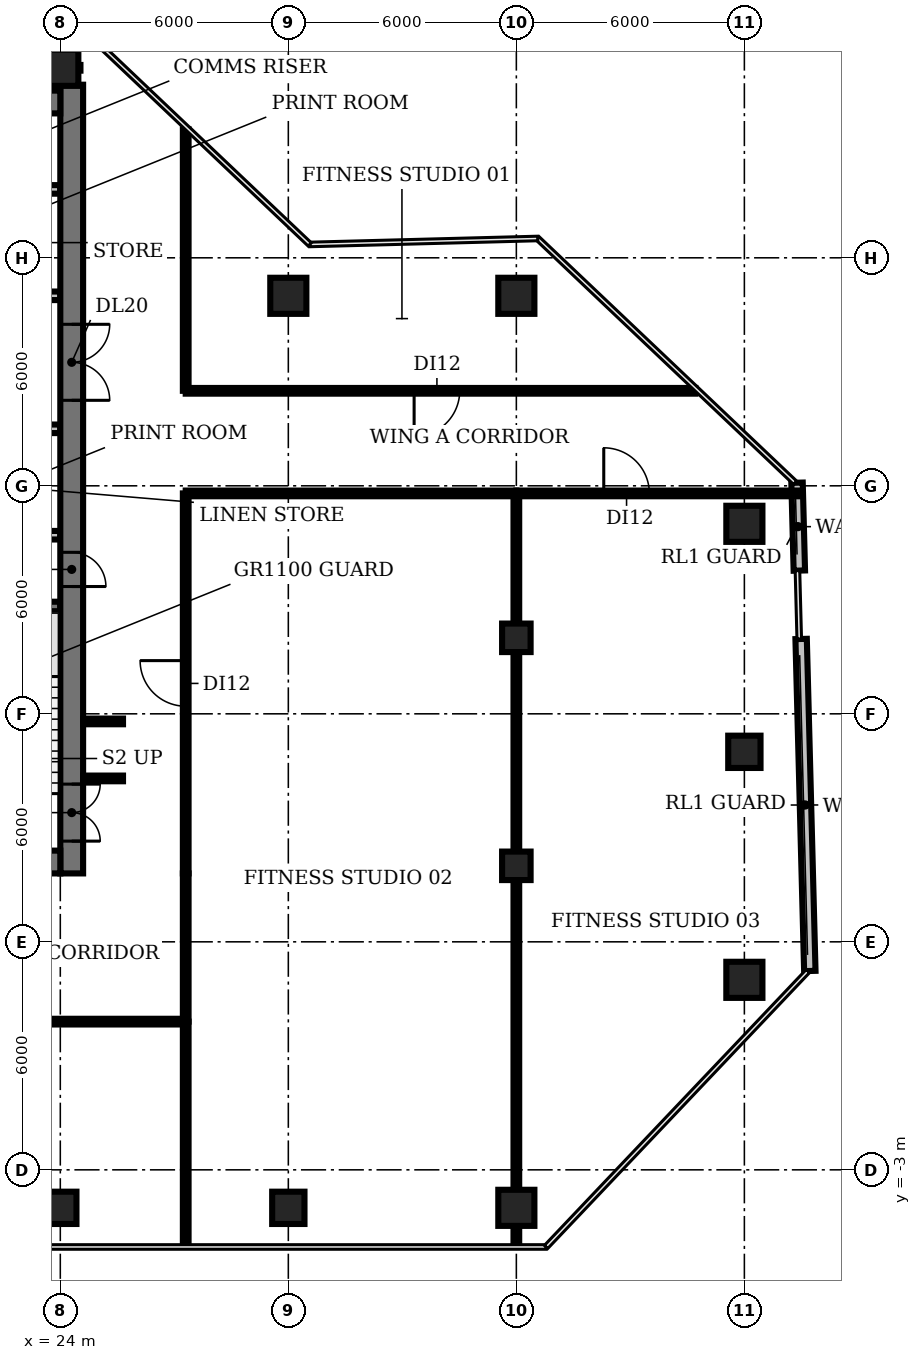
"""IFC4 building model, lengths in metres.
Left out: names, types, materials, properties, quantities, classifications, styles, units other than length and angle.
Written with IfcOpenShell. Run it as: python <this file> out.ifc"""

import sys

from ifc_helpers import new_model, si_unit, direction, frame, frame_2d, origin, origin_2d, place, context, subcontext, project, spatial, rectangle, circle, extrude, element, fill, save


model = new_model("IFC4")
c1 = context("Model", 3, precision=1e-05, world=origin(), true_north=direction((0.0, 1.0)))
c2 = subcontext(c1, "Body", "Model", "MODEL_VIEW")
j1 = project(units=[si_unit("LENGTHUNIT", "METRE"), si_unit("PLANEANGLEUNIT", "RADIAN")], contexts=[c1])
p1 = place(None, origin())
s1 = spatial("IfcSite", under=j1, at=p1, CompositionType="ELEMENT")
p2 = place(p1, origin())
s2 = spatial("IfcBuilding", under=s1, at=p2, CompositionType="ELEMENT")
p3 = place(p2, frame((0.0, 0.0, 176.0)))
s3 = spatial("IfcBuildingStorey", under=s2, at=p3, CompositionType="ELEMENT", Elevation=176.0)
p4 = place(p3, frame((24.0, -4.0, 0.0), z_axis=(0.0, 0.0, 1.0), x_axis=(1.0, 0.0, 0.0)))
e1 = element("IfcColumn", 1, at=p4, inside=s3, PredefinedType="COLUMN", context=c2, shape_type="SweptSolid", body=[
    extrude(rectangle(XDim=0.85, YDim=0.85, at=origin_2d()), origin(), (0.0, 0.0, 1.0), 3.85),
])
p5 = place(p3, frame((24.0, 26.0, 0.0), z_axis=(0.0, 0.0, 1.0), x_axis=(1.0, 0.0, 0.0)))
e2 = element("IfcColumn", 2, at=p5, inside=s3, PredefinedType="COLUMN", context=c2, shape_type="SweptSolid", body=[
    extrude(circle(Radius=0.475, at=origin_2d()), origin(), (0.0, 0.0, 1.0), 3.85),
])
p6 = place(p3, frame((30.0, -4.0, 0.0), z_axis=(0.0, 0.0, 1.0), x_axis=(1.0, 0.0, 0.0)))
e3 = element("IfcColumn", 3, at=p6, inside=s3, PredefinedType="COLUMN", context=c2, shape_type="SweptSolid", body=[
    extrude(rectangle(XDim=0.85, YDim=0.85, at=origin_2d()), origin(), (0.0, 0.0, 1.0), 3.85),
])
for number, where, z_axis, x_axis in (
    (4, (30.0, 20.0, 0.0), (0.0, 0.0, 1.0), (1.0, 0.0, 0.0)),
    (5, (36.0, -4.0, 0.0), (0.0, 0.0, 1.0), (1.0, 0.0, 0.0)),
):
    element("IfcColumn", number, at=place(p3, frame(where, z_axis=z_axis, x_axis=x_axis)), inside=s3, PredefinedType="COLUMN", context=c2, shape_type="SweptSolid", body=[
        extrude(circle(Radius=0.475, at=origin_2d()), origin(), (0.0, 0.0, 1.0), 3.85),
    ])
for number, where, z_axis, x_axis in (
    (6, (36.0, 5.0, 0.0), (0.0, 0.0, 1.0), (1.0, 0.0, 0.0)),
    (7, (36.0, 11.0, 0.0), (0.0, 0.0, 1.0), (1.0, 0.0, 0.0)),
):
    element("IfcColumn", number, at=place(p3, frame(where, z_axis=z_axis, x_axis=x_axis)), inside=s3, PredefinedType="COLUMN", context=c2, shape_type="SweptSolid", body=[
        extrude(rectangle(XDim=0.75, YDim=0.75, at=origin_2d()), origin(), (0.0, 0.0, 1.0), 3.85),
    ])
for number, where, z_axis, x_axis in (
    (8, (36.0, 20.0, 0.0), (0.0, 0.0, 1.0), (1.0, 0.0, 0.0)),
    (9, (42.0, 2.0, 0.0), (0.0, 0.0, 1.0), (1.0, 0.0, 0.0)),
):
    element("IfcColumn", number, at=place(p3, frame(where, z_axis=z_axis, x_axis=x_axis)), inside=s3, PredefinedType="COLUMN", context=c2, shape_type="SweptSolid", body=[
        extrude(circle(Radius=0.475, at=origin_2d()), origin(), (0.0, 0.0, 1.0), 3.85),
    ])
p7 = place(p3, frame((42.0, 8.0, 0.0), z_axis=(0.0, 0.0, 1.0), x_axis=(1.0, 0.0, 0.0)))
e10 = element("IfcColumn", 10, at=p7, inside=s3, PredefinedType="COLUMN", context=c2, shape_type="SweptSolid", body=[
    extrude(rectangle(XDim=0.85, YDim=0.85, at=origin_2d()), origin(), (0.0, 0.0, 1.0), 3.85),
])
p8 = place(p3, frame((42.0, 14.0, 0.0), z_axis=(0.0, 0.0, 1.0), x_axis=(1.0, 0.0, 0.0)))
e11 = element("IfcColumn", 11, at=p8, inside=s3, PredefinedType="COLUMN", context=c2, shape_type="SweptSolid", body=[
    extrude(circle(Radius=0.475, at=origin_2d()), origin(), (0.0, 0.0, 1.0), 3.85),
])
p9 = place(p3, frame((43.722, 2.233, 0.0), z_axis=(0.0, 0.0, 1.0), x_axis=(-0.026202368137, 0.99965665901, 0.0)))
e12 = element("IfcWall", 12, at=p9, inside=s3, PredefinedType="SOLIDWALL", context=c2, shape_type="SweptSolid", body=[
    extrude(rectangle(XDim=8.74, YDim=0.3, at=frame_2d((4.37, 0.0))), origin(), (0.0, 0.0, 1.0), 3.85),
])
p10 = place(p3, frame((43.446, 12.769, 0.0), z_axis=(0.0, 0.0, 1.0), x_axis=(-0.026065246512, 0.999660243745, 0.0)))
e13 = element("IfcWall", 13, at=p10, inside=s3, PredefinedType="SOLIDWALL", context=c2, shape_type="SweptSolid", body=[
    extrude(rectangle(XDim=2.313, YDim=0.3, at=frame_2d((1.157, 0.0))), origin(), (0.0, 0.0, 1.0), 3.85),
])
p11 = place(p3, frame((20.85, 11.825, 0.0), z_axis=(0.0, 0.0, 1.0), x_axis=(1.0, 0.0, 0.0)))
e14 = element("IfcWall", 14, at=p11, inside=s3, PredefinedType="SHEAR", context=c2, shape_type="SweptSolid", body=[
    extrude(rectangle(XDim=3.15, YDim=0.25, at=frame_2d((1.575, 0.0))), origin(), (0.0, 0.0, 1.0), 3.85),
])
p12 = place(p3, frame((16.6, 13.7, 0.0), z_axis=(0.0, 0.0, 1.0), x_axis=(1.0, 0.0, 0.0)))
e15 = element("IfcWall", 15, at=p12, inside=s3, PredefinedType="PARTITIONING", context=c2, shape_type="SweptSolid", body=[
    extrude(rectangle(XDim=7.4, YDim=0.225, at=frame_2d((3.7, 0.0))), origin(), (0.0, 0.0, 1.0), 3.85),
])
p13 = place(p3, frame((9.4, 16.5, 0.0), z_axis=(0.0, 0.0, 1.0), x_axis=(1.0, 0.0, 0.0)))
e16 = element("IfcWall", 16, at=p13, inside=s3, PredefinedType="PARTITIONING", context=c2, shape_type="SweptSolid", body=[
    extrude(rectangle(XDim=14.6, YDim=0.225, at=frame_2d((7.3, 0.0))), origin(), (0.0, 0.0, 1.0), 3.85),
])
p14 = place(p13, frame((0.55, 0.0, 0.0)))
e17 = element("IfcOpeningElement", 17, at=p14, cuts=e16, PredefinedType="OPENING", context=c2, shape_type="SweptSolid", body=[
    extrude(rectangle(XDim=0.9, YDim=2.1, at=frame_2d((0.45, 1.05))), frame((0.0, 0.123, 0.0), z_axis=(0.0, -1.0, 0.0), x_axis=(1.0, 0.0, 0.0)), (0.0, 0.0, 1.0), 0.245),
])
p15 = place(p13, frame((6.075, 0.0, 0.0)))
e18 = element("IfcOpeningElement", 18, at=p15, cuts=e16, PredefinedType="OPENING", context=c2, shape_type="SweptSolid", body=[
    extrude(rectangle(XDim=1.0, YDim=2.1, at=frame_2d((0.5, 1.05))), frame((0.0, 0.123, 0.0), z_axis=(0.0, -1.0, 0.0), x_axis=(1.0, 0.0, 0.0)), (0.0, 0.0, 1.0), 0.245),
])
p16 = place(p13, frame((11.308, 0.0, 0.0)))
e19 = element("IfcOpeningElement", 19, at=p16, cuts=e16, PredefinedType="OPENING", context=c2, shape_type="SweptSolid", body=[
    extrude(rectangle(XDim=0.9, YDim=2.1, at=frame_2d((0.45, 1.05))), frame((0.0, 0.123, 0.0), z_axis=(0.0, -1.0, 0.0), x_axis=(1.0, 0.0, 0.0)), (0.0, 0.0, 1.0), 0.245),
])
p17 = place(p13, frame((13.083, 0.0, 0.0)))
e20 = element("IfcOpeningElement", 20, at=p17, cuts=e16, PredefinedType="OPENING", context=c2, shape_type="SweptSolid", body=[
    extrude(rectangle(XDim=0.9, YDim=2.1, at=frame_2d((0.45, 1.05))), frame((0.0, 0.123, 0.0), z_axis=(0.0, -1.0, 0.0), x_axis=(1.0, 0.0, 0.0)), (0.0, 0.0, 1.0), 0.245),
])
p18 = place(p3, frame((24.0, 20.0, 0.0), z_axis=(0.0, 0.0, 1.0), x_axis=(-1.0, 0.0, 0.0)))
e21 = element("IfcWall", 21, at=p18, inside=s3, PredefinedType="PARTITIONING", context=c2, shape_type="SweptSolid", body=[
    extrude(rectangle(XDim=14.6, YDim=0.225, at=frame_2d((7.3, 0.0))), origin(), (0.0, 0.0, 1.0), 3.85),
])
p19 = place(p18, frame((12.75, 0.0, 0.0)))
e22 = element("IfcOpeningElement", 22, at=p19, cuts=e21, PredefinedType="OPENING", context=c2, shape_type="SweptSolid", body=[
    extrude(rectangle(XDim=1.1, YDim=2.1, at=frame_2d((0.55, 1.05))), frame((0.0, 0.123, 0.0), z_axis=(0.0, -1.0, 0.0), x_axis=(1.0, 0.0, 0.0)), (0.0, 0.0, 1.0), 0.245),
])
p20 = place(p18, frame((9.95, 0.0, 0.0)))
e23 = element("IfcOpeningElement", 23, at=p20, cuts=e21, PredefinedType="OPENING", context=c2, shape_type="SweptSolid", body=[
    extrude(rectangle(XDim=1.1, YDim=2.1, at=frame_2d((0.55, 1.05))), frame((0.0, 0.123, 0.0), z_axis=(0.0, -1.0, 0.0), x_axis=(1.0, 0.0, 0.0)), (0.0, 0.0, 1.0), 0.245),
])
p21 = place(p18, frame((7.15, 0.0, 0.0)))
e24 = element("IfcOpeningElement", 24, at=p21, cuts=e21, PredefinedType="OPENING", context=c2, shape_type="SweptSolid", body=[
    extrude(rectangle(XDim=1.1, YDim=2.1, at=frame_2d((0.55, 1.05))), frame((0.0, 0.123, 0.0), z_axis=(0.0, -1.0, 0.0), x_axis=(1.0, 0.0, 0.0)), (0.0, 0.0, 1.0), 0.245),
])
p22 = place(p18, frame((4.35, 0.0, 0.0)))
e25 = element("IfcOpeningElement", 25, at=p22, cuts=e21, PredefinedType="OPENING", context=c2, shape_type="SweptSolid", body=[
    extrude(rectangle(XDim=1.1, YDim=2.1, at=frame_2d((0.55, 1.05))), frame((0.0, 0.123, 0.0), z_axis=(0.0, -1.0, 0.0), x_axis=(1.0, 0.0, 0.0)), (0.0, 0.0, 1.0), 0.245),
])
p23 = place(p18, frame((2.308, 0.0, 0.0)))
e26 = element("IfcOpeningElement", 26, at=p23, cuts=e21, PredefinedType="OPENING", context=c2, shape_type="SweptSolid", body=[
    extrude(rectangle(XDim=0.9, YDim=2.1, at=frame_2d((0.45, 1.05))), frame((0.0, 0.123, 0.0), z_axis=(0.0, -1.0, 0.0), x_axis=(1.0, 0.0, 0.0)), (0.0, 0.0, 1.0), 0.245),
])
p24 = place(p18, frame((0.532, 0.0, 0.0)))
e27 = element("IfcOpeningElement", 27, at=p24, cuts=e21, PredefinedType="OPENING", context=c2, shape_type="SweptSolid", body=[
    extrude(rectangle(XDim=0.9, YDim=2.1, at=frame_2d((0.45, 1.05))), frame((0.0, 0.123, 0.0), z_axis=(0.0, -1.0, 0.0), x_axis=(1.0, 0.0, 0.0)), (0.0, 0.0, 1.0), 0.245),
])
p25 = place(p3, frame((9.4, 22.8, 0.0), z_axis=(0.0, 0.0, 1.0), x_axis=(1.0, 0.0, 0.0)))
e28 = element("IfcWall", 28, at=p25, inside=s3, PredefinedType="PARTITIONING", context=c2, shape_type="SweptSolid", body=[
    extrude(rectangle(XDim=14.6, YDim=0.225, at=frame_2d((7.3, 0.0))), origin(), (0.0, 0.0, 1.0), 3.85),
])
p26 = place(p3, frame((24.3, 25.555, 0.0), z_axis=(0.0, 0.0, 1.0), x_axis=(0.0, -1.0, 0.0)))
e29 = element("IfcWall", 29, at=p26, inside=s3, PredefinedType="SHEAR", context=c2, shape_type="SweptSolid", body=[
    extrude(rectangle(XDim=20.755, YDim=0.6, at=frame_2d((10.377, 0.0))), origin(), (0.0, 0.0, 1.0), 3.85),
])
p27 = place(p26, frame((18.405, 0.0, 0.0)))
e30 = element("IfcOpeningElement", 30, at=p27, cuts=e29, PredefinedType="OPENING", context=c2, shape_type="SweptSolid", body=[
    extrude(rectangle(XDim=1.5, YDim=2.1, at=frame_2d((0.75, 1.05))), frame((0.0, 0.31, 0.0), z_axis=(0.0, -1.0, 0.0), x_axis=(1.0, 0.0, 0.0)), (0.0, 0.0, 1.0), 0.62),
])
p28 = place(p26, frame((12.305, 0.0, 0.0)))
e31 = element("IfcOpeningElement", 31, at=p28, cuts=e29, PredefinedType="OPENING", context=c2, shape_type="SweptSolid", body=[
    extrude(rectangle(XDim=0.9, YDim=2.1, at=frame_2d((0.45, 1.05))), frame((0.0, 0.31, 0.0), z_axis=(0.0, -1.0, 0.0), x_axis=(1.0, 0.0, 0.0)), (0.0, 0.0, 1.0), 0.62),
])
p29 = place(p26, frame((6.305, 0.0, 0.0)))
e32 = element("IfcOpeningElement", 32, at=p29, cuts=e29, PredefinedType="OPENING", context=c2, shape_type="SweptSolid", body=[
    extrude(rectangle(XDim=2.0, YDim=2.1, at=frame_2d((1.0, 1.05))), frame((0.0, 0.31, 0.0), z_axis=(0.0, -1.0, 0.0), x_axis=(1.0, 0.0, 0.0)), (0.0, 0.0, 1.0), 0.62),
])
p30 = place(p3, frame((24.0, 5.1, 0.0), z_axis=(0.0, 0.0, 1.0), x_axis=(-1.0, 0.0, 0.0)))
e33 = element("IfcWall", 33, at=p30, inside=s3, PredefinedType="SHEAR", context=c2, shape_type="SweptSolid", body=[
    extrude(rectangle(XDim=18.0, YDim=0.6, at=frame_2d((9.0, 0.0))), origin(), (0.0, 0.0, 1.0), 3.85),
])
p31 = place(p30, frame((13.0, 0.0, 0.0)))
e34 = element("IfcOpeningElement", 34, at=p31, cuts=e33, PredefinedType="OPENING", context=c2, shape_type="SweptSolid", body=[
    extrude(rectangle(XDim=1.2, YDim=2.1, at=frame_2d((0.6, 1.05))), frame((0.0, 0.31, 0.0), z_axis=(0.0, -1.0, 0.0), x_axis=(1.0, 0.0, 0.0)), (0.0, 0.0, 1.0), 0.62),
])
p32 = place(p30, frame((4.9, 0.0, 0.0)))
e35 = element("IfcOpeningElement", 35, at=p32, cuts=e33, PredefinedType="OPENING", context=c2, shape_type="SweptSolid", body=[
    extrude(rectangle(XDim=1.0, YDim=2.1, at=frame_2d((0.5, 1.05))), frame((0.0, 0.31, 0.0), z_axis=(0.0, -1.0, 0.0), x_axis=(1.0, 0.0, 0.0)), (0.0, 0.0, 1.0), 0.62),
])
p33 = place(p3, frame((6.0, 25.1, 0.0), z_axis=(0.0, 0.0, 1.0), x_axis=(1.0, 0.0, 0.0)))
e36 = element("IfcWall", 36, at=p33, inside=s3, PredefinedType="SHEAR", context=c2, shape_type="SweptSolid", body=[
    extrude(rectangle(XDim=18.0, YDim=0.6, at=frame_2d((9.0, 0.0))), origin(), (0.0, 0.0, 1.0), 3.85),
])
p34 = place(p3, frame((23.48, 26.0, 0.0), z_axis=(0.0, 0.0, 1.0), x_axis=(1.0, 0.0, 0.0)))
e37 = element("IfcWall", 37, at=p34, inside=s3, PredefinedType="PARTITIONING", context=c2, shape_type="SweptSolid", body=[
    extrude(rectangle(XDim=1.05, YDim=0.15, at=frame_2d((0.525, 0.0))), origin(), (0.0, 0.0, 1.0), 2.88),
])
for number, where, z_axis, x_axis in (
    (38, (24.6, 7.3, 0.0), (0.0, 0.0, 1.0), (1.0, 0.0, 0.0)),
    (39, (24.6, 8.8, 0.0), (0.0, 0.0, 1.0), (1.0, 0.0, 0.0)),
):
    element("IfcWall", number, at=place(p3, frame(where, z_axis=z_axis, x_axis=x_axis)), inside=s3, PredefinedType="PARTITIONING", context=c2, shape_type="SweptSolid", body=[
        extrude(rectangle(XDim=1.05, YDim=0.15, at=frame_2d((0.525, 0.0))), origin(), (0.0, 0.0, 1.0), 2.88),
    ])
p35 = place(p3, frame((27.3, -4.98, 0.0), z_axis=(0.0, 0.0, 1.0), x_axis=(0.0, 1.0, 0.0)))
e40 = element("IfcWall", 40, at=p35, inside=s3, PredefinedType="PARTITIONING", context=c2, shape_type="SweptSolid", body=[
    extrude(rectangle(XDim=5.88, YDim=0.15, at=frame_2d((2.94, 0.0))), origin(), (0.0, 0.0, 1.0), 2.88),
])
p36 = place(p3, frame((27.3, 0.9, 0.0), z_axis=(0.0, 0.0, 1.0), x_axis=(-1.0, 0.0, 0.0)))
e41 = element("IfcWall", 41, at=p36, inside=s3, PredefinedType="PARTITIONING", context=c2, shape_type="SweptSolid", body=[
    extrude(rectangle(XDim=24.6, YDim=0.15, at=frame_2d((12.3, 0.0))), origin(), (0.0, 0.0, 1.0), 2.88),
])
p37 = place(p36, frame((11.8, 0.0, 0.0)))
e42 = element("IfcOpeningElement", 42, at=p37, cuts=e41, PredefinedType="OPENING", context=c2, shape_type="SweptSolid", body=[
    extrude(rectangle(XDim=1.2, YDim=2.1, at=frame_2d((0.6, 1.05))), frame((0.0, 0.085, 0.0), z_axis=(0.0, -1.0, 0.0), x_axis=(1.0, 0.0, 0.0)), (0.0, 0.0, 1.0), 0.17),
])
p38 = place(p3, frame((27.3, 0.9, 0.0), z_axis=(0.0, 0.0, 1.0), x_axis=(0.0, 1.0, 0.0)))
e43 = element("IfcWall", 43, at=p38, inside=s3, PredefinedType="PARTITIONING", context=c2, shape_type="SweptSolid", body=[
    extrude(rectangle(XDim=3.9, YDim=0.15, at=frame_2d((1.95, 0.0))), origin(), (0.0, 0.0, 1.0), 2.88),
])
p39 = place(p3, frame((27.3, 4.8, 0.0), z_axis=(0.0, 0.0, 1.0), x_axis=(0.0, 1.0, 0.0)))
e44 = element("IfcWall", 44, at=p39, inside=s3, PredefinedType="PARTITIONING", context=c2, shape_type="SweptSolid", body=[
    extrude(rectangle(XDim=10.0, YDim=0.15, at=frame_2d((5.0, 0.0))), origin(), (0.0, 0.0, 1.0), 2.88),
])
p40 = place(p39, frame((4.4, 0.0, 0.0)))
e45 = element("IfcOpeningElement", 45, at=p40, cuts=e44, PredefinedType="OPENING", context=c2, shape_type="SweptSolid", body=[
    extrude(rectangle(XDim=1.2, YDim=2.1, at=frame_2d((0.6, 1.05))), frame((0.0, 0.085, 0.0), z_axis=(0.0, -1.0, 0.0), x_axis=(1.0, 0.0, 0.0)), (0.0, 0.0, 1.0), 0.17),
])
p41 = place(p3, frame((27.3, 14.8, 0.0), z_axis=(0.0, 0.0, 1.0), x_axis=(1.0, 0.0, 0.0)))
e46 = element("IfcWall", 46, at=p41, inside=s3, PredefinedType="PARTITIONING", context=c2, shape_type="SweptSolid", body=[
    extrude(rectangle(XDim=8.7, YDim=0.15, at=frame_2d((4.35, 0.0))), origin(), (0.0, 0.0, 1.0), 2.88),
])
p42 = place(p3, frame((27.3, 17.5, 0.0), z_axis=(0.0, 0.0, 1.0), x_axis=(0.0, 1.0, 0.0)))
e47 = element("IfcWall", 47, at=p42, inside=s3, PredefinedType="PARTITIONING", context=c2, shape_type="SweptSolid", body=[
    extrude(rectangle(XDim=6.88, YDim=0.15, at=frame_2d((3.44, 0.0))), origin(), (0.0, 0.0, 1.0), 2.88),
])
p43 = place(p3, frame((36.0, -4.98, 0.0), z_axis=(0.0, 0.0, 1.0), x_axis=(0.0, 1.0, 0.0)))
e48 = element("IfcWall", 48, at=p43, inside=s3, PredefinedType="PARTITIONING", context=c2, shape_type="SweptSolid", body=[
    extrude(rectangle(XDim=19.78, YDim=0.15, at=frame_2d((9.89, 0.0))), origin(), (0.0, 0.0, 1.0), 2.88),
])
p44 = place(p3, frame((36.0, 14.8, 0.0), z_axis=(0.0, 0.0, 1.0), x_axis=(1.0, 0.0, 0.0)))
e49 = element("IfcWall", 49, at=p44, inside=s3, PredefinedType="PARTITIONING", context=c2, shape_type="SweptSolid", body=[
    extrude(rectangle(XDim=7.404, YDim=0.15, at=frame_2d((3.702, 0.0))), origin(), (0.0, 0.0, 1.0), 2.88),
])
p45 = place(p44, frame((2.3, 0.0, 0.0)))
e50 = element("IfcOpeningElement", 50, at=p45, cuts=e49, PredefinedType="OPENING", context=c2, shape_type="SweptSolid", body=[
    extrude(rectangle(XDim=1.2, YDim=2.1, at=frame_2d((0.6, 1.05))), frame((0.0, 0.085, 0.0), z_axis=(0.0, -1.0, 0.0), x_axis=(1.0, 0.0, 0.0)), (0.0, 0.0, 1.0), 0.17),
])
p46 = place(p3, frame((40.71, 17.5, 0.0), z_axis=(0.0, 0.0, 1.0), x_axis=(-1.0, 0.0, 0.0)))
e51 = element("IfcWall", 51, at=p46, inside=s3, PredefinedType="PARTITIONING", context=c2, shape_type="SweptSolid", body=[
    extrude(rectangle(XDim=13.41, YDim=0.15, at=frame_2d((6.705, 0.0))), origin(), (0.0, 0.0, 1.0), 2.88),
])
p47 = place(p46, frame((6.2, 0.0, 0.0)))
e52 = element("IfcOpeningElement", 52, at=p47, cuts=e51, PredefinedType="OPENING", context=c2, shape_type="SweptSolid", body=[
    extrude(rectangle(XDim=1.2, YDim=2.1, at=frame_2d((0.6, 1.05))), frame((0.0, 0.085, 0.0), z_axis=(0.0, -1.0, 0.0), x_axis=(1.0, 0.0, 0.0)), (0.0, 0.0, 1.0), 0.17),
])
p48 = place(p27, origin())
e53 = element("IfcDoor", 53, at=p48, inside=s3, OperationType="DOUBLE_DOOR_SINGLE_SWING", PredefinedType="DOOR", context=c2, shape_type="SweptSolid", body=[
    extrude(rectangle(XDim=1.5, YDim=2.1, at=frame_2d((0.75, 1.05))), frame((0.0, 0.025, 0.0), z_axis=(0.0, -1.0, 0.0), x_axis=(1.0, 0.0, 0.0)), (0.0, 0.0, 1.0), 0.05),
])
fill(e30, e53)
p49 = place(p28, origin())
e54 = element("IfcDoor", 54, at=p49, inside=s3, OperationType="SINGLE_SWING_RIGHT", PredefinedType="DOOR", context=c2, shape_type="SweptSolid", body=[
    extrude(rectangle(XDim=0.9, YDim=2.1, at=frame_2d((0.45, 1.05))), frame((0.0, -0.24, 0.0), z_axis=(0.0, -1.0, 0.0), x_axis=(1.0, 0.0, 0.0)), (0.0, 0.0, 1.0), 0.05),
])
fill(e31, e54)
p50 = place(p29, origin())
e55 = element("IfcDoor", 55, at=p50, inside=s3, OperationType="DOUBLE_DOOR_SINGLE_SWING", PredefinedType="DOOR", context=c2, shape_type="SweptSolid", body=[
    extrude(rectangle(XDim=2.0, YDim=2.1, at=frame_2d((1.0, 1.05))), frame((0.0, 0.025, 0.0), z_axis=(0.0, -1.0, 0.0), x_axis=(1.0, 0.0, 0.0)), (0.0, 0.0, 1.0), 0.05),
])
fill(e32, e55)
p51 = place(p40, origin())
e56 = element("IfcDoor", 56, at=p51, inside=s3, OperationType="SINGLE_SWING_RIGHT", PredefinedType="DOOR", context=c2, shape_type="SweptSolid", body=[
    extrude(rectangle(XDim=1.2, YDim=2.1, at=frame_2d((0.6, 1.05))), frame((0.0, 0.025, 0.0), z_axis=(0.0, -1.0, 0.0), x_axis=(1.0, 0.0, 0.0)), (0.0, 0.0, 1.0), 0.05),
])
fill(e45, e56)
p52 = place(p45, origin())
e57 = element("IfcDoor", 57, at=p52, inside=s3, OperationType="SINGLE_SWING_LEFT", PredefinedType="DOOR", context=c2, shape_type="SweptSolid", body=[
    extrude(rectangle(XDim=1.2, YDim=2.1, at=frame_2d((0.6, 1.05))), frame((0.0, 0.025, 0.0), z_axis=(0.0, -1.0, 0.0), x_axis=(1.0, 0.0, 0.0)), (0.0, 0.0, 1.0), 0.05),
])
fill(e50, e57)
p53 = place(p47, origin())
e58 = element("IfcDoor", 58, at=p53, inside=s3, OperationType="SINGLE_SWING_RIGHT", PredefinedType="DOOR", context=c2, shape_type="SweptSolid", body=[
    extrude(rectangle(XDim=1.2, YDim=2.1, at=frame_2d((0.6, 1.05))), frame((0.0, 0.025, 0.0), z_axis=(0.0, -1.0, 0.0), x_axis=(1.0, 0.0, 0.0)), (0.0, 0.0, 1.0), 0.05),
])
fill(e52, e58)
save(model, sys.argv[1])
